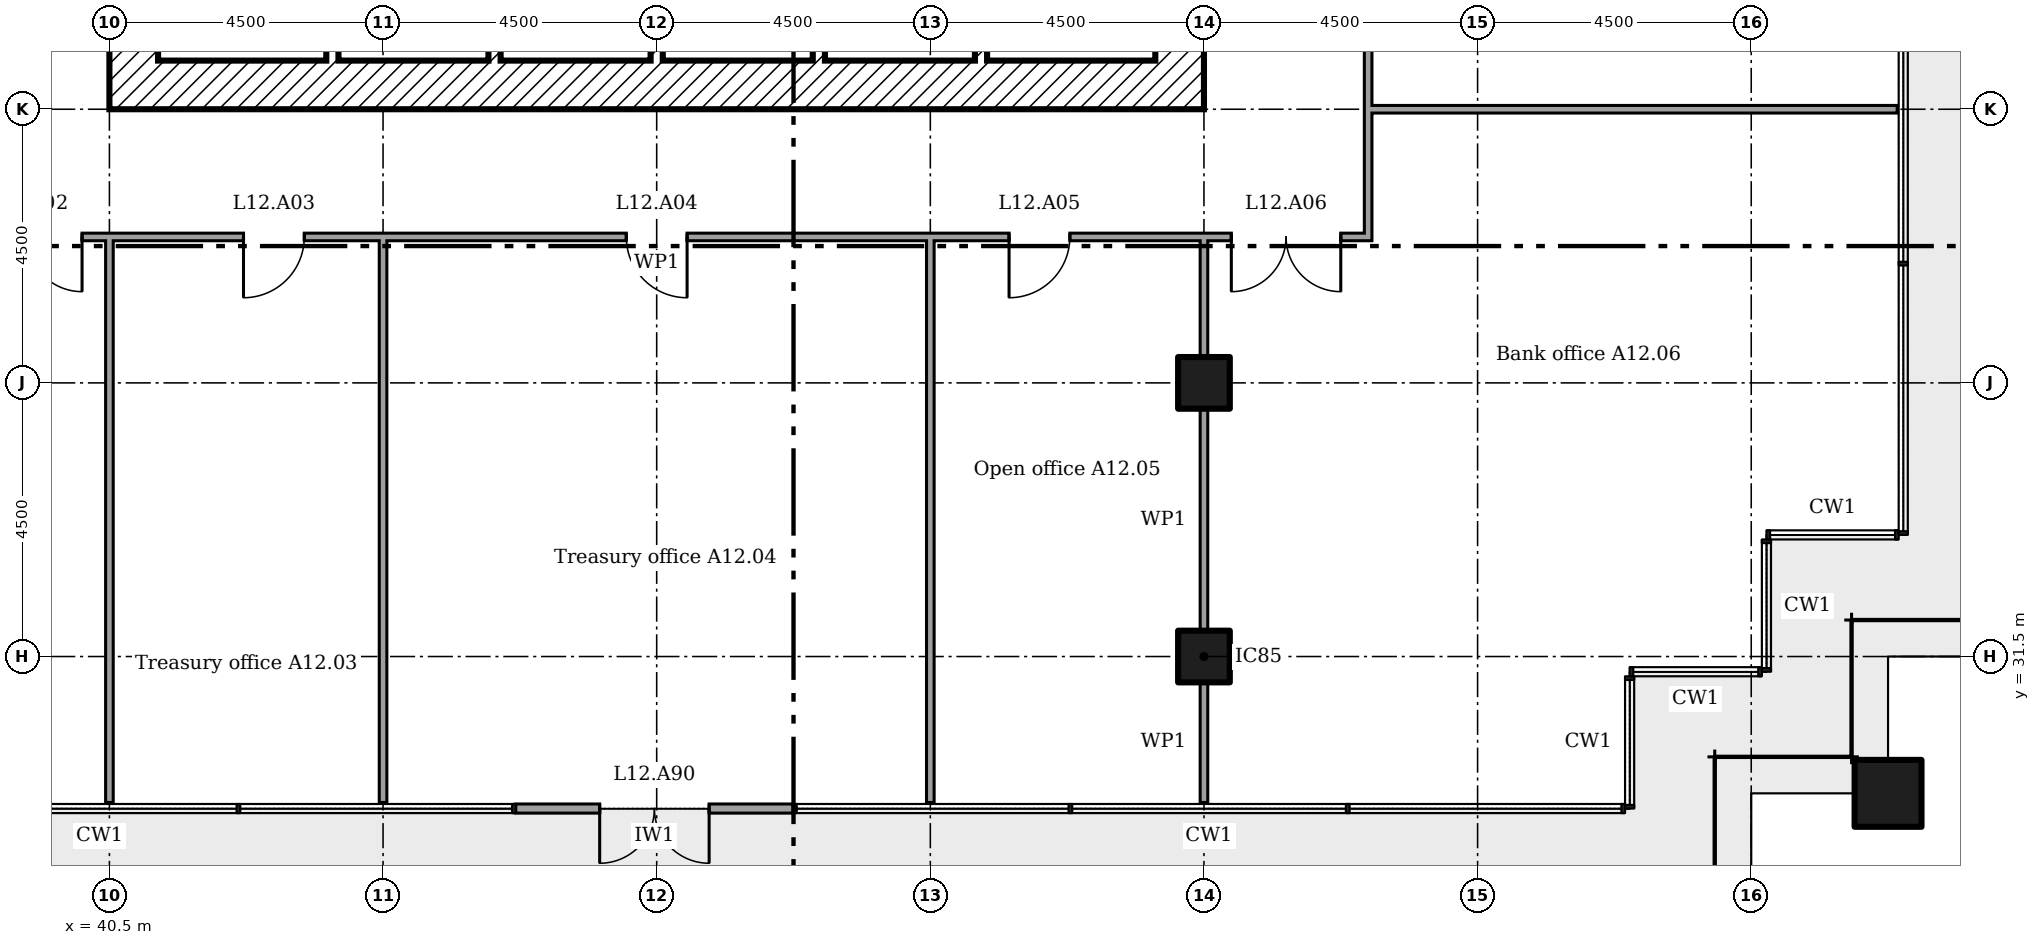
"""IFC4 building model, lengths in metres.
Left out: names, types, materials, properties, quantities, classifications, styles, units other than length and angle.
Written with IfcOpenShell. Run it as: python <this file> out.ifc"""

import sys

from ifc_helpers import new_model, si_unit, direction, frame, frame_2d, origin, origin_2d, place, context, subcontext, project, spatial, rectangle, extrude, element, fill, save


model = new_model("IFC4")
c1 = context("Model", 3, precision=1e-05, world=origin(), true_north=direction((0.0, 1.0)))
c2 = subcontext(c1, "Body", "Model", "MODEL_VIEW")
j1 = project(units=[si_unit("LENGTHUNIT", "METRE"), si_unit("PLANEANGLEUNIT", "RADIAN")], contexts=[c1])
p1 = place(None, origin())
s1 = spatial("IfcSite", under=j1, at=p1, CompositionType="ELEMENT")
p2 = place(p1, origin())
s2 = spatial("IfcBuilding", under=s1, at=p2, CompositionType="ELEMENT")
p3 = place(p2, frame((0.0, 0.0, 54.6)))
s3 = spatial("IfcBuildingStorey", under=s2, at=p3, CompositionType="ELEMENT", Elevation=54.6)
p4 = place(p3, frame((69.75, 29.25, 0.0)))
e1 = element("IfcColumn", 1, at=p4, inside=s3, PredefinedType="COLUMN", context=c2, shape_type="SweptSolid", body=[
    extrude(rectangle(XDim=1.1, YDim=1.1, at=origin_2d()), origin(), (0.0, 0.0, 1.0), 3.6),
])
for number, where in (
    (2, (58.5, 31.5, 0.0)),
    (3, (58.5, 36.0, 0.0)),
):
    element("IfcColumn", number, at=place(p3, frame(where)), inside=s3, PredefinedType="COLUMN", context=c2, shape_type="SweptSolid", body=[
        extrude(rectangle(XDim=0.85, YDim=0.85, at=origin_2d()), origin(), (0.0, 0.0, 1.0), 3.6),
    ])
p5 = place(p3, frame((47.182, 29.0, 0.0)))
e4 = element("IfcWall", 4, at=p5, inside=s3, PredefinedType="SOLIDWALL", context=c2, shape_type="SweptSolid", body=[
    extrude(rectangle(XDim=4.561, YDim=0.15, at=frame_2d((2.28, 0.0))), origin(), (0.0, 0.0, 1.0), 3.45),
])
p6 = place(p5, frame((1.38, 0.0, 0.0)))
e5 = element("IfcOpeningElement", 5, at=p6, cuts=e4, PredefinedType="OPENING", context=c2, shape_type="SweptSolid", body=[
    extrude(rectangle(XDim=1.8, YDim=2.4, at=frame_2d((0.9, 1.2))), frame((0.0, 0.085, 0.0), z_axis=(0.0, -1.0, 0.0), x_axis=(1.0, 0.0, 0.0)), (0.0, 0.0, 1.0), 0.17),
])
p7 = place(p3, frame((58.1, 40.5, 0.0), z_axis=(0.0, 0.0, 1.0), x_axis=(0.0, 1.0, 0.0)))
e6 = element("IfcWall", 6, at=p7, inside=s3, PredefinedType="SHEAR", context=c2, shape_type="SweptSolid", body=[
    extrude(rectangle(XDim=18.0, YDim=0.8, at=frame_2d((9.0, 0.0))), origin(), (0.0, 0.0, 1.0), 3.35),
])
p8 = place(p7, frame((13.15, 0.0, 0.0)))
e7 = element("IfcOpeningElement", 7, at=p8, cuts=e6, PredefinedType="OPENING", context=c2, shape_type="SweptSolid", body=[
    extrude(rectangle(XDim=1.2, YDim=2.1, at=frame_2d((0.6, 1.05))), frame((0.0, 0.41, 0.0), z_axis=(0.0, -1.0, 0.0), x_axis=(1.0, 0.0, 0.0)), (0.0, 0.0, 1.0), 0.82),
])
p9 = place(p7, frame((3.9, 0.0, 0.0)))
e8 = element("IfcOpeningElement", 8, at=p9, cuts=e6, PredefinedType="OPENING", context=c2, shape_type="SweptSolid", body=[
    extrude(rectangle(XDim=1.8, YDim=2.1, at=frame_2d((0.9, 1.05))), frame((0.0, 0.41, 0.0), z_axis=(0.0, -1.0, 0.0), x_axis=(1.0, 0.0, 0.0)), (0.0, 0.0, 1.0), 0.82),
])
p10 = place(p7, frame((11.525, 0.0, 0.0)))
e9 = element("IfcOpeningElement", 9, at=p10, cuts=e6, PredefinedType="OPENING", context=c2, shape_type="SweptSolid", body=[
    extrude(rectangle(XDim=1.0, YDim=2.1, at=frame_2d((0.5, 1.05))), frame((0.0, 0.41, 0.0), z_axis=(0.0, -1.0, 0.0), x_axis=(1.0, 0.0, 0.0)), (0.0, 0.0, 1.0), 0.82),
])
p11 = place(p3, frame((41.3, 40.9, 0.0)))
e10 = element("IfcWall", 10, at=p11, inside=s3, PredefinedType="SHEAR", context=c2, shape_type="SweptSolid", body=[
    extrude(rectangle(XDim=16.4, YDim=0.8, at=frame_2d((8.2, 0.0))), origin(), (0.0, 0.0, 1.0), 3.35),
])
p12 = place(p3, frame((40.9, 40.5, 0.0), z_axis=(0.0, 0.0, 1.0), x_axis=(0.0, 1.0, 0.0)))
e11 = element("IfcWall", 11, at=p12, inside=s3, PredefinedType="SHEAR", context=c2, shape_type="SweptSolid", body=[
    extrude(rectangle(XDim=18.0, YDim=0.8, at=frame_2d((9.0, 0.0))), origin(), (0.0, 0.0, 1.0), 3.35),
])
p13 = place(p12, frame((3.65, 0.0, 0.0)))
e12 = element("IfcOpeningElement", 12, at=p13, cuts=e11, PredefinedType="OPENING", context=c2, shape_type="SweptSolid", body=[
    extrude(rectangle(XDim=1.2, YDim=2.1, at=frame_2d((0.6, 1.05))), frame((0.0, 0.41, 0.0), z_axis=(0.0, -1.0, 0.0), x_axis=(1.0, 0.0, 0.0)), (0.0, 0.0, 1.0), 0.82),
])
p14 = place(p12, frame((5.475, 0.0, 0.0)))
e13 = element("IfcOpeningElement", 13, at=p14, cuts=e11, PredefinedType="OPENING", context=c2, shape_type="SweptSolid", body=[
    extrude(rectangle(XDim=1.0, YDim=2.1, at=frame_2d((0.5, 1.05))), frame((0.0, 0.41, 0.0), z_axis=(0.0, -1.0, 0.0), x_axis=(1.0, 0.0, 0.0)), (0.0, 0.0, 1.0), 0.82),
])
p15 = place(p12, frame((12.3, 0.0, 0.0)))
e14 = element("IfcOpeningElement", 14, at=p15, cuts=e11, PredefinedType="OPENING", context=c2, shape_type="SweptSolid", body=[
    extrude(rectangle(XDim=1.0, YDim=2.1, at=frame_2d((0.5, 1.05))), frame((0.0, 0.41, 0.0), z_axis=(0.0, -1.0, 0.0), x_axis=(1.0, 0.0, 0.0)), (0.0, 0.0, 1.0), 0.82),
])
for number, where, z_axis, x_axis in (
    (15, (44.167, 41.3, 0.0), (0.0, 0.0, 1.0), (0.0, 1.0, 0.0)),
    (16, (46.833, 41.3, 0.0), (0.0, 0.0, 1.0), (0.0, 1.0, 0.0)),
    (17, (49.5, 41.3, 0.0), (0.0, 0.0, 1.0), (0.0, 1.0, 0.0)),
    (18, (52.167, 41.3, 0.0), (0.0, 0.0, 1.0), (0.0, 1.0, 0.0)),
    (19, (54.833, 41.3, 0.0), (0.0, 0.0, 1.0), (0.0, 1.0, 0.0)),
):
    element("IfcWall", number, at=place(p3, frame(where, z_axis=z_axis, x_axis=x_axis)), inside=s3, PredefinedType="SHEAR", context=c2, shape_type="SweptSolid", body=[
        extrude(rectangle(XDim=2.5, YDim=0.2, at=frame_2d((1.25, 0.0))), origin(), (0.0, 0.0, 1.0), 3.35),
    ])
p16 = place(p3, frame((37.738, 38.4, 0.0)))
e20 = element("IfcWall", 20, at=p16, inside=s3, PredefinedType="PARTITIONING", context=c2, shape_type="SweptSolid", body=[
    extrude(rectangle(XDim=23.525, YDim=0.125, at=frame_2d((11.762, 0.0))), origin(), (0.0, 0.0, 1.0), 3.45),
])
p17 = place(p16, frame((0.512, 0.0, 0.0)))
e21 = element("IfcOpeningElement", 21, at=p17, cuts=e20, PredefinedType="OPENING", context=c2, shape_type="SweptSolid", body=[
    extrude(rectangle(XDim=1.8, YDim=2.1, at=frame_2d((0.9, 1.05))), frame((0.0, 0.073, 0.0), z_axis=(0.0, -1.0, 0.0), x_axis=(1.0, 0.0, 0.0)), (0.0, 0.0, 1.0), 0.145),
])
p18 = place(p16, frame((4.968, 0.0, 0.0)))
e22 = element("IfcOpeningElement", 22, at=p18, cuts=e20, PredefinedType="OPENING", context=c2, shape_type="SweptSolid", body=[
    extrude(rectangle(XDim=1.0, YDim=2.1, at=frame_2d((0.5, 1.05))), frame((0.0, 0.073, 0.0), z_axis=(0.0, -1.0, 0.0), x_axis=(1.0, 0.0, 0.0)), (0.0, 0.0, 1.0), 0.145),
])
p19 = place(p16, frame((11.262, 0.0, 0.0)))
e23 = element("IfcOpeningElement", 23, at=p19, cuts=e20, PredefinedType="OPENING", context=c2, shape_type="SweptSolid", body=[
    extrude(rectangle(XDim=1.0, YDim=2.1, at=frame_2d((0.5, 1.05))), frame((0.0, 0.073, 0.0), z_axis=(0.0, -1.0, 0.0), x_axis=(1.0, 0.0, 0.0)), (0.0, 0.0, 1.0), 0.145),
])
p20 = place(p16, frame((17.558, 0.0, 0.0)))
e24 = element("IfcOpeningElement", 24, at=p20, cuts=e20, PredefinedType="OPENING", context=c2, shape_type="SweptSolid", body=[
    extrude(rectangle(XDim=1.0, YDim=2.1, at=frame_2d((0.5, 1.05))), frame((0.0, 0.073, 0.0), z_axis=(0.0, -1.0, 0.0), x_axis=(1.0, 0.0, 0.0)), (0.0, 0.0, 1.0), 0.145),
])
p21 = place(p16, frame((21.212, 0.0, 0.0)))
e25 = element("IfcOpeningElement", 25, at=p21, cuts=e20, PredefinedType="OPENING", context=c2, shape_type="SweptSolid", body=[
    extrude(rectangle(XDim=1.8, YDim=2.1, at=frame_2d((0.9, 1.05))), frame((0.0, 0.073, 0.0), z_axis=(0.0, -1.0, 0.0), x_axis=(1.0, 0.0, 0.0)), (0.0, 0.0, 1.0), 0.145),
])
p22 = place(p3, frame((61.2, 40.5, 0.0)))
e26 = element("IfcWall", 26, at=p22, inside=s3, PredefinedType="PARTITIONING", context=c2, shape_type="SweptSolid", body=[
    extrude(rectangle(XDim=8.7, YDim=0.125, at=frame_2d((4.35, 0.0))), origin(), (0.0, 0.0, 1.0), 2.766),
])
for number, where, z_axis, x_axis in (
    (27, (40.5, 29.1, 0.0), (0.0, 0.0, 1.0), (0.0, 1.0, 0.0)),
    (28, (45.0, 29.1, 0.0), (0.0, 0.0, 1.0), (0.0, 1.0, 0.0)),
    (29, (54.0, 29.1, 0.0), (0.0, 0.0, 1.0), (0.0, 1.0, 0.0)),
):
    element("IfcWall", number, at=place(p3, frame(where, z_axis=z_axis, x_axis=x_axis)), inside=s3, PredefinedType="PARTITIONING", context=c2, shape_type="SweptSolid", body=[
        extrude(rectangle(XDim=9.3, YDim=0.125, at=frame_2d((4.65, 0.0))), origin(), (0.0, 0.0, 1.0), 2.766),
    ])
p23 = place(p3, frame((58.5, 29.1, 0.0), z_axis=(0.0, 0.0, 1.0), x_axis=(0.0, 1.0, 0.0)))
e30 = element("IfcWall", 30, at=p23, inside=s3, PredefinedType="PARTITIONING", context=c2, shape_type="SweptSolid", body=[
    extrude(rectangle(XDim=1.975, YDim=0.125, at=frame_2d((0.987, 0.0))), origin(), (0.0, 0.0, 1.0), 2.676),
])
p24 = place(p3, frame((58.5, 31.925, 0.0), z_axis=(0.0, 0.0, 1.0), x_axis=(0.0, 1.0, 0.0)))
e31 = element("IfcWall", 31, at=p24, inside=s3, PredefinedType="PARTITIONING", context=c2, shape_type="SweptSolid", body=[
    extrude(rectangle(XDim=3.65, YDim=0.125, at=frame_2d((1.825, 0.0))), origin(), (0.0, 0.0, 1.0), 2.676),
])
p25 = place(p3, frame((58.5, 36.425, 0.0), z_axis=(0.0, 0.0, 1.0), x_axis=(0.0, 1.0, 0.0)))
e32 = element("IfcWall", 32, at=p25, inside=s3, PredefinedType="PARTITIONING", context=c2, shape_type="SweptSolid", body=[
    extrude(rectangle(XDim=1.975, YDim=0.125, at=frame_2d((0.987, 0.0))), origin(), (0.0, 0.0, 1.0), 2.676),
])
p26 = place(p3, frame((61.2, 38.462, 0.0), z_axis=(0.0, 0.0, 1.0), x_axis=(0.0, 1.0, 0.0)))
e33 = element("IfcWall", 33, at=p26, inside=s3, PredefinedType="PARTITIONING", context=c2, shape_type="SweptSolid", body=[
    extrude(rectangle(XDim=22.075, YDim=0.125, at=frame_2d((11.038, 0.0))), origin(), (0.0, 0.0, 1.0), 3.45),
])
p27 = place(p26, frame((6.038, 0.0, 0.0)))
e34 = element("IfcOpeningElement", 34, at=p27, cuts=e33, PredefinedType="OPENING", context=c2, shape_type="SweptSolid", body=[
    extrude(rectangle(XDim=1.0, YDim=2.1, at=frame_2d((0.5, 1.05))), frame((0.0, 0.073, 0.0), z_axis=(0.0, -1.0, 0.0), x_axis=(1.0, 0.0, 0.0)), (0.0, 0.0, 1.0), 0.145),
])
p28 = place(p26, frame((12.333, 0.0, 0.0)))
e35 = element("IfcOpeningElement", 35, at=p28, cuts=e33, PredefinedType="OPENING", context=c2, shape_type="SweptSolid", body=[
    extrude(rectangle(XDim=1.0, YDim=2.1, at=frame_2d((0.5, 1.05))), frame((0.0, 0.073, 0.0), z_axis=(0.0, -1.0, 0.0), x_axis=(1.0, 0.0, 0.0)), (0.0, 0.0, 1.0), 0.145),
])
p29 = place(p26, frame((17.742, 0.0, 0.0)))
e36 = element("IfcOpeningElement", 36, at=p29, cuts=e33, PredefinedType="OPENING", context=c2, shape_type="SweptSolid", body=[
    extrude(rectangle(XDim=1.0, YDim=2.1, at=frame_2d((0.5, 1.05))), frame((0.0, 0.073, 0.0), z_axis=(0.0, -1.0, 0.0), x_axis=(1.0, 0.0, 0.0)), (0.0, 0.0, 1.0), 0.145),
])
p30 = place(p6, frame((1.8, 0.0, 0.0), x_axis=(-1.0, 0.0, 0.0)))
e37 = element("IfcDoor", 37, at=p30, inside=s3, OperationType="DOUBLE_DOOR_DOUBLE_SWING", PredefinedType="NOTDEFINED", context=c2, shape_type="SweptSolid", body=[
    extrude(rectangle(XDim=1.8, YDim=2.4, at=frame_2d((0.9, 1.2))), frame((0.0, 0.025, 0.0), z_axis=(0.0, -1.0, 0.0), x_axis=(1.0, 0.0, 0.0)), (0.0, 0.0, 1.0), 0.05),
])
fill(e5, e37)
p31 = place(p17, frame((1.8, 0.0, 0.0), x_axis=(-1.0, 0.0, 0.0)))
e38 = element("IfcDoor", 38, at=p31, inside=s3, OperationType="DOUBLE_DOOR_SINGLE_SWING", PredefinedType="DOOR", context=c2, shape_type="SweptSolid", body=[
    extrude(rectangle(XDim=1.8, YDim=2.1, at=frame_2d((0.9, 1.05))), frame((0.0, 0.025, 0.0), z_axis=(0.0, -1.0, 0.0), x_axis=(1.0, 0.0, 0.0)), (0.0, 0.0, 1.0), 0.05),
])
fill(e21, e38)
p32 = place(p18, frame((1.0, 0.0, 0.0), x_axis=(-1.0, 0.0, 0.0)))
e39 = element("IfcDoor", 39, at=p32, inside=s3, OperationType="SINGLE_SWING_LEFT", PredefinedType="DOOR", context=c2, shape_type="SweptSolid", body=[
    extrude(rectangle(XDim=1.0, YDim=2.1, at=frame_2d((0.5, 1.05))), frame((0.0, 0.025, 0.0), z_axis=(0.0, -1.0, 0.0), x_axis=(1.0, 0.0, 0.0)), (0.0, 0.0, 1.0), 0.05),
])
fill(e22, e39)
p33 = place(p19, frame((1.0, 0.0, 0.0), x_axis=(-1.0, 0.0, 0.0)))
e40 = element("IfcDoor", 40, at=p33, inside=s3, OperationType="SINGLE_SWING_RIGHT", PredefinedType="DOOR", context=c2, shape_type="SweptSolid", body=[
    extrude(rectangle(XDim=1.0, YDim=2.1, at=frame_2d((0.5, 1.05))), frame((0.0, 0.025, 0.0), z_axis=(0.0, -1.0, 0.0), x_axis=(1.0, 0.0, 0.0)), (0.0, 0.0, 1.0), 0.05),
])
fill(e23, e40)
p34 = place(p20, frame((1.0, 0.0, 0.0), x_axis=(-1.0, 0.0, 0.0)))
e41 = element("IfcDoor", 41, at=p34, inside=s3, OperationType="SINGLE_SWING_LEFT", PredefinedType="DOOR", context=c2, shape_type="SweptSolid", body=[
    extrude(rectangle(XDim=1.0, YDim=2.1, at=frame_2d((0.5, 1.05))), frame((0.0, 0.025, 0.0), z_axis=(0.0, -1.0, 0.0), x_axis=(1.0, 0.0, 0.0)), (0.0, 0.0, 1.0), 0.05),
])
fill(e24, e41)
p35 = place(p21, frame((1.8, 0.0, 0.0), x_axis=(-1.0, 0.0, 0.0)))
e42 = element("IfcDoor", 42, at=p35, inside=s3, OperationType="DOUBLE_DOOR_SINGLE_SWING", PredefinedType="DOOR", context=c2, shape_type="SweptSolid", body=[
    extrude(rectangle(XDim=1.8, YDim=2.1, at=frame_2d((0.9, 1.05))), frame((0.0, 0.025, 0.0), z_axis=(0.0, -1.0, 0.0), x_axis=(1.0, 0.0, 0.0)), (0.0, 0.0, 1.0), 0.05),
])
fill(e25, e42)
save(model, sys.argv[1])
